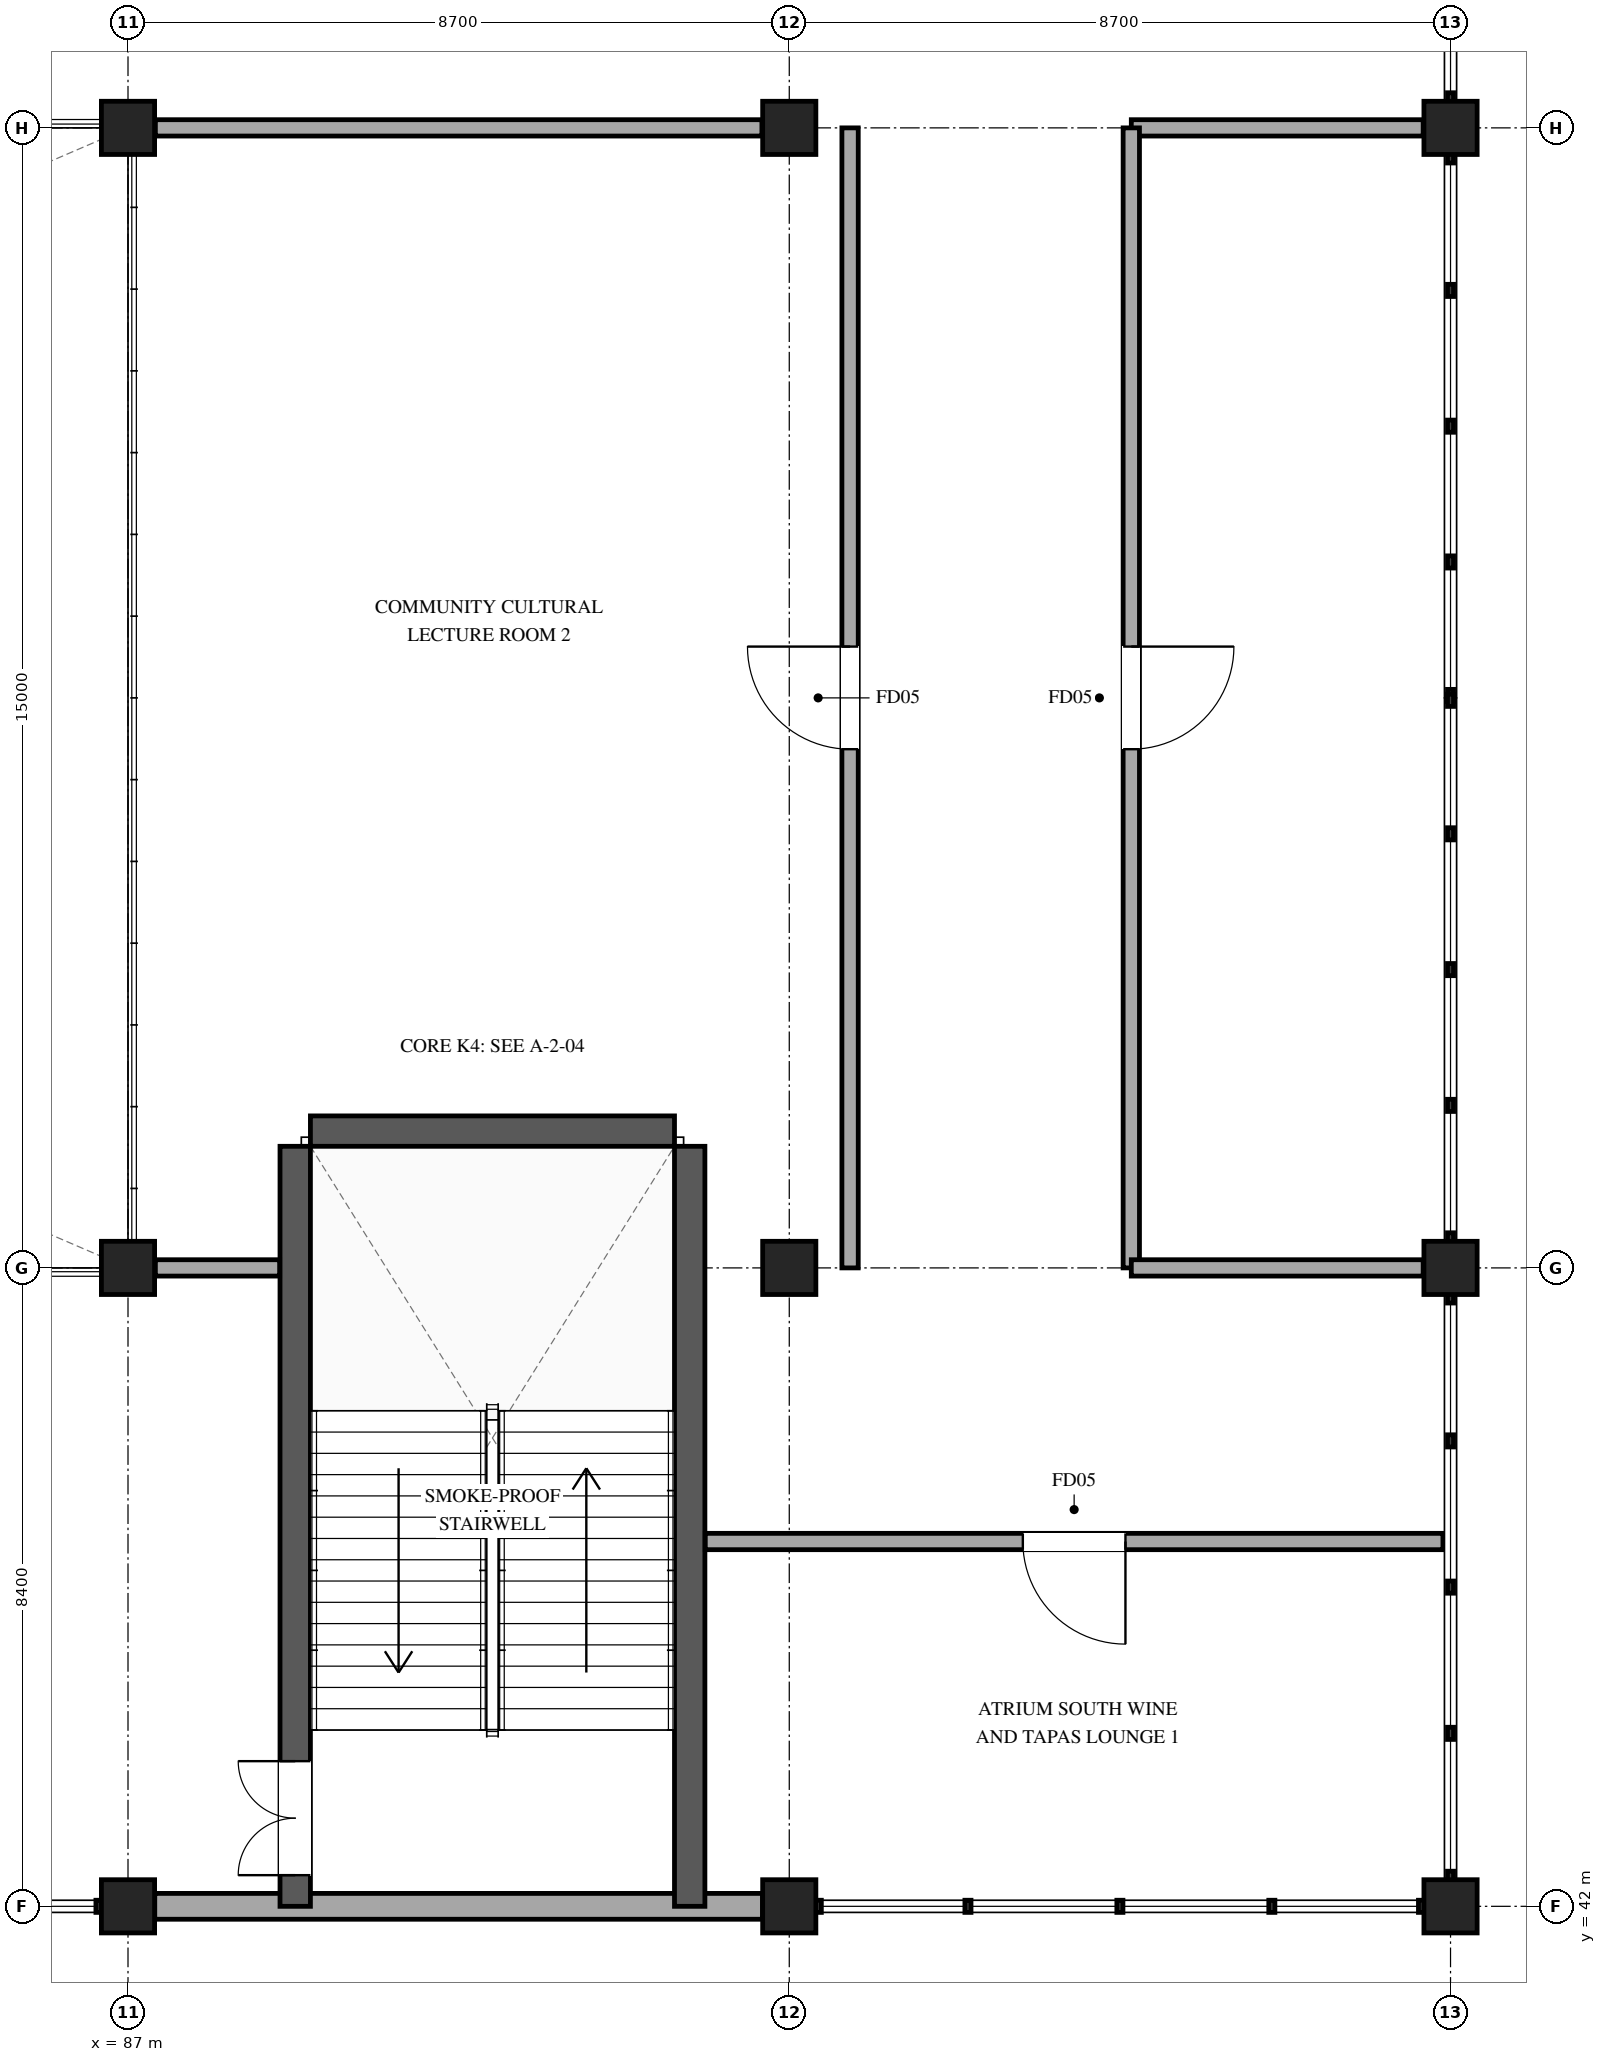
"""IFC4 building model, lengths in metres.
Left out: names, types, materials, properties, quantities, classifications, styles, units other than length and angle.
Written with IfcOpenShell. Run it as: python <this file> out.ifc"""

import sys

from ifc_helpers import new_model, si_unit, direction, frame, frame_2d, origin, origin_2d, place, context, subcontext, project, spatial, rectangle, extrude, element, fill, save


model = new_model("IFC4")
c1 = context("Model", 3, precision=1e-05, world=origin(), true_north=direction((0.0, 1.0)))
c2 = subcontext(c1, "Body", "Model", "MODEL_VIEW")
j1 = project(units=[si_unit("LENGTHUNIT", "METRE"), si_unit("PLANEANGLEUNIT", "RADIAN")], contexts=[c1])
p1 = place(None, origin())
s1 = spatial("IfcSite", under=j1, at=p1, CompositionType="ELEMENT")
p2 = place(p1, origin())
s2 = spatial("IfcBuilding", under=s1, at=p2, CompositionType="ELEMENT")
p3 = place(p2, frame((0.0, 0.0, 26.7)))
s3 = spatial("IfcBuildingStorey", under=s2, at=p3, CompositionType="ELEMENT", Elevation=26.7)
for number, where, z_axis, x_axis in (
    (1, (87.0, 42.0, 0.0), (0.0, 0.0, 1.0), (1.0, 0.0, 0.0)),
    (2, (87.0, 50.4, 0.0), (0.0, 0.0, 1.0), (1.0, 0.0, 0.0)),
    (3, (87.0, 65.4, 0.0), (0.0, 0.0, 1.0), (1.0, 0.0, 0.0)),
    (4, (95.7, 42.0, 0.0), (0.0, 0.0, 1.0), (1.0, 0.0, 0.0)),
    (5, (95.7, 50.4, 0.0), (0.0, 0.0, 1.0), (1.0, 0.0, 0.0)),
    (6, (95.7, 65.4, 0.0), (0.0, 0.0, 1.0), (1.0, 0.0, 0.0)),
    (7, (104.4, 42.0, 0.0), (0.0, 0.0, 1.0), (1.0, 0.0, 0.0)),
    (8, (104.4, 50.4, 0.0), (0.0, 0.0, 1.0), (1.0, 0.0, 0.0)),
    (9, (104.4, 65.4, 0.0), (0.0, 0.0, 1.0), (1.0, 0.0, 0.0)),
):
    element("IfcColumn", number, at=place(p3, frame(where, z_axis=z_axis, x_axis=x_axis)), inside=s3, PredefinedType="COLUMN", context=c2, shape_type="SweptSolid", body=[
        extrude(rectangle(XDim=0.7, YDim=0.7, at=origin_2d()), origin(), (0.0, 0.0, 1.0), 4.8),
    ])
p4 = place(p3, frame((95.348, 42.0, 0.0), z_axis=(0.0, 0.0, 1.0), x_axis=(-1.0, 0.0, 0.0)))
e10 = element("IfcWall", 10, at=p4, inside=s3, PredefinedType="STANDARD", context=c2, shape_type="SweptSolid", body=[
    extrude(rectangle(XDim=7.996, YDim=0.34, at=frame_2d((3.998, 0.0))), origin(), (0.0, 0.0, 1.0), 4.49),
])
p5 = place(p3, frame((89.2, 42.0, 0.0), z_axis=(0.0, 0.0, 1.0), x_axis=(0.0, 1.0, 0.0)))
e11 = element("IfcWall", 11, at=p5, inside=s3, PredefinedType="SHEAR", context=c2, shape_type="SweptSolid", body=[
    extrude(rectangle(XDim=10.0, YDim=0.4, at=frame_2d((5.0, 0.0))), origin(), (0.0, 0.0, 1.0), 4.8),
])
p6 = place(p5, frame((0.41, 0.0, 0.0)))
e12 = element("IfcOpeningElement", 12, at=p6, cuts=e11, PredefinedType="OPENING", context=c2, shape_type="SweptSolid", body=[
    extrude(rectangle(XDim=1.5, YDim=2.2, at=frame_2d((0.75, 1.1))), frame((0.0, 0.21, 0.0), z_axis=(0.0, -1.0, 0.0), x_axis=(1.0, 0.0, 0.0)), (0.0, 0.0, 1.0), 0.42),
])
p7 = place(p3, frame((94.39, 52.0, 0.0), z_axis=(0.0, 0.0, 1.0), x_axis=(0.0, -1.0, 0.0)))
e13 = element("IfcWall", 13, at=p7, inside=s3, PredefinedType="SHEAR", context=c2, shape_type="SweptSolid", body=[
    extrude(rectangle(XDim=10.0, YDim=0.4, at=frame_2d((5.0, 0.0))), origin(), (0.0, 0.0, 1.0), 4.8),
])
p8 = place(p3, frame((89.4, 52.2, 0.0), z_axis=(0.0, 0.0, 1.0), x_axis=(1.0, 0.0, 0.0)))
e14 = element("IfcWall", 14, at=p8, inside=s3, PredefinedType="SHEAR", context=c2, shape_type="SweptSolid", body=[
    extrude(rectangle(XDim=4.79, YDim=0.4, at=frame_2d((2.395, 0.0))), origin(), (0.0, 0.0, 1.0), 4.8),
])
p9 = place(p3, frame((104.3, 46.8, 0.0), z_axis=(0.0, 0.0, 1.0), x_axis=(-1.0, 0.0, 0.0)))
e15 = element("IfcWall", 15, at=p9, inside=s3, PredefinedType="PARTITIONING", context=c2, shape_type="SweptSolid", body=[
    extrude(rectangle(XDim=9.705, YDim=0.215, at=frame_2d((4.853, 0.0))), origin(), (0.0, 0.0, 1.0), 3.76),
])
p10 = place(p9, frame((4.177, 0.0, 0.0)))
e16 = element("IfcOpeningElement", 16, at=p10, cuts=e15, PredefinedType="OPENING", context=c2, shape_type="SweptSolid", body=[
    extrude(rectangle(XDim=1.35, YDim=2.2, at=frame_2d((0.675, 1.1))), frame((0.0, 0.118, 0.0), z_axis=(0.0, -1.0, 0.0), x_axis=(1.0, 0.0, 0.0)), (0.0, 0.0, 1.0), 0.235),
])
p11 = place(p3, frame((104.04, 65.4, 0.0), z_axis=(0.0, 0.0, 1.0), x_axis=(-1.0, 0.0, 0.0)))
e17 = element("IfcWall", 17, at=p11, inside=s3, PredefinedType="PARTITIONING", context=c2, shape_type="SweptSolid", body=[
    extrude(rectangle(XDim=3.84, YDim=0.215, at=frame_2d((1.92, 0.0))), origin(), (0.0, 0.0, 1.0), 3.76),
])
p12 = place(p3, frame((100.2, 65.4, 0.0), z_axis=(0.0, 0.0, 1.0), x_axis=(0.0, -1.0, 0.0)))
e18 = element("IfcWall", 18, at=p12, inside=s3, PredefinedType="PARTITIONING", context=c2, shape_type="SweptSolid", body=[
    extrude(rectangle(XDim=15.0, YDim=0.215, at=frame_2d((7.5, 0.0))), origin(), (0.0, 0.0, 1.0), 3.76),
])
p13 = place(p12, frame((6.825, 0.0, 0.0)))
e19 = element("IfcOpeningElement", 19, at=p13, cuts=e18, PredefinedType="OPENING", context=c2, shape_type="SweptSolid", body=[
    extrude(rectangle(XDim=1.35, YDim=2.2, at=frame_2d((0.675, 1.1))), frame((0.0, 0.118, 0.0), z_axis=(0.0, -1.0, 0.0), x_axis=(1.0, 0.0, 0.0)), (0.0, 0.0, 1.0), 0.235),
])
p14 = place(p3, frame((100.2, 50.4, 0.0), z_axis=(0.0, 0.0, 1.0), x_axis=(1.0, 0.0, 0.0)))
e20 = element("IfcWall", 20, at=p14, inside=s3, PredefinedType="PARTITIONING", context=c2, shape_type="SweptSolid", body=[
    extrude(rectangle(XDim=3.84, YDim=0.215, at=frame_2d((1.92, 0.0))), origin(), (0.0, 0.0, 1.0), 3.76),
])
p15 = place(p3, frame((87.36, 50.4, 0.0), z_axis=(0.0, 0.0, 1.0), x_axis=(1.0, 0.0, 0.0)))
e21 = element("IfcWall", 21, at=p15, inside=s3, PredefinedType="PARTITIONING", context=c2, shape_type="SweptSolid", body=[
    extrude(rectangle(XDim=1.635, YDim=0.215, at=frame_2d((0.817, 0.0))), origin(), (0.0, 0.0, 1.0), 4.46),
])
p16 = place(p3, frame((96.5, 50.4, 0.0), z_axis=(0.0, 0.0, 1.0), x_axis=(0.0, 1.0, 0.0)))
e22 = element("IfcWall", 22, at=p16, inside=s3, PredefinedType="PARTITIONING", context=c2, shape_type="SweptSolid", body=[
    extrude(rectangle(XDim=15.0, YDim=0.215, at=frame_2d((7.5, 0.0))), origin(), (0.0, 0.0, 1.0), 3.76),
])
p17 = place(p16, frame((6.825, 0.0, 0.0)))
e23 = element("IfcOpeningElement", 23, at=p17, cuts=e22, PredefinedType="OPENING", context=c2, shape_type="SweptSolid", body=[
    extrude(rectangle(XDim=1.35, YDim=2.2, at=frame_2d((0.675, 1.1))), frame((0.0, 0.118, 0.0), z_axis=(0.0, -1.0, 0.0), x_axis=(1.0, 0.0, 0.0)), (0.0, 0.0, 1.0), 0.235),
])
p18 = place(p3, frame((95.34, 65.4, 0.0), z_axis=(0.0, 0.0, 1.0), x_axis=(-1.0, 0.0, 0.0)))
e24 = element("IfcWall", 24, at=p18, inside=s3, PredefinedType="PARTITIONING", context=c2, shape_type="SweptSolid", body=[
    extrude(rectangle(XDim=7.98, YDim=0.215, at=frame_2d((3.99, 0.0))), origin(), (0.0, 0.0, 1.0), 3.76),
])
p19 = place(p6, origin())
e25 = element("IfcDoor", 25, at=p19, inside=s3, OperationType="DOUBLE_DOOR_SINGLE_SWING", PredefinedType="DOOR", context=c2, shape_type="SweptSolid", body=[
    extrude(rectangle(XDim=1.5, YDim=2.2, at=frame_2d((0.75, 1.1))), frame((0.0, 0.025, 0.0), z_axis=(0.0, -1.0, 0.0), x_axis=(1.0, 0.0, 0.0)), (0.0, 0.0, 1.0), 0.05),
])
fill(e12, e25)
p20 = place(p10, origin())
e26 = element("IfcDoor", 26, at=p20, inside=s3, OperationType="SINGLE_SWING_LEFT", PredefinedType="DOOR", context=c2, shape_type="SweptSolid", body=[
    extrude(rectangle(XDim=1.35, YDim=2.2, at=frame_2d((0.675, 1.1))), frame((0.0, 0.025, 0.0), z_axis=(0.0, -1.0, 0.0), x_axis=(1.0, 0.0, 0.0)), (0.0, 0.0, 1.0), 0.05),
])
fill(e16, e26)
p21 = place(p13, origin())
e27 = element("IfcDoor", 27, at=p21, inside=s3, OperationType="SINGLE_SWING_LEFT", PredefinedType="DOOR", context=c2, shape_type="SweptSolid", body=[
    extrude(rectangle(XDim=1.35, YDim=2.2, at=frame_2d((0.675, 1.1))), frame((0.0, 0.025, 0.0), z_axis=(0.0, -1.0, 0.0), x_axis=(1.0, 0.0, 0.0)), (0.0, 0.0, 1.0), 0.05),
])
fill(e19, e27)
p22 = place(p17, origin())
e28 = element("IfcDoor", 28, at=p22, inside=s3, OperationType="SINGLE_SWING_RIGHT", PredefinedType="DOOR", context=c2, shape_type="SweptSolid", body=[
    extrude(rectangle(XDim=1.35, YDim=2.2, at=frame_2d((0.675, 1.1))), frame((0.0, 0.025, 0.0), z_axis=(0.0, -1.0, 0.0), x_axis=(1.0, 0.0, 0.0)), (0.0, 0.0, 1.0), 0.05),
])
fill(e23, e28)
save(model, sys.argv[1])
